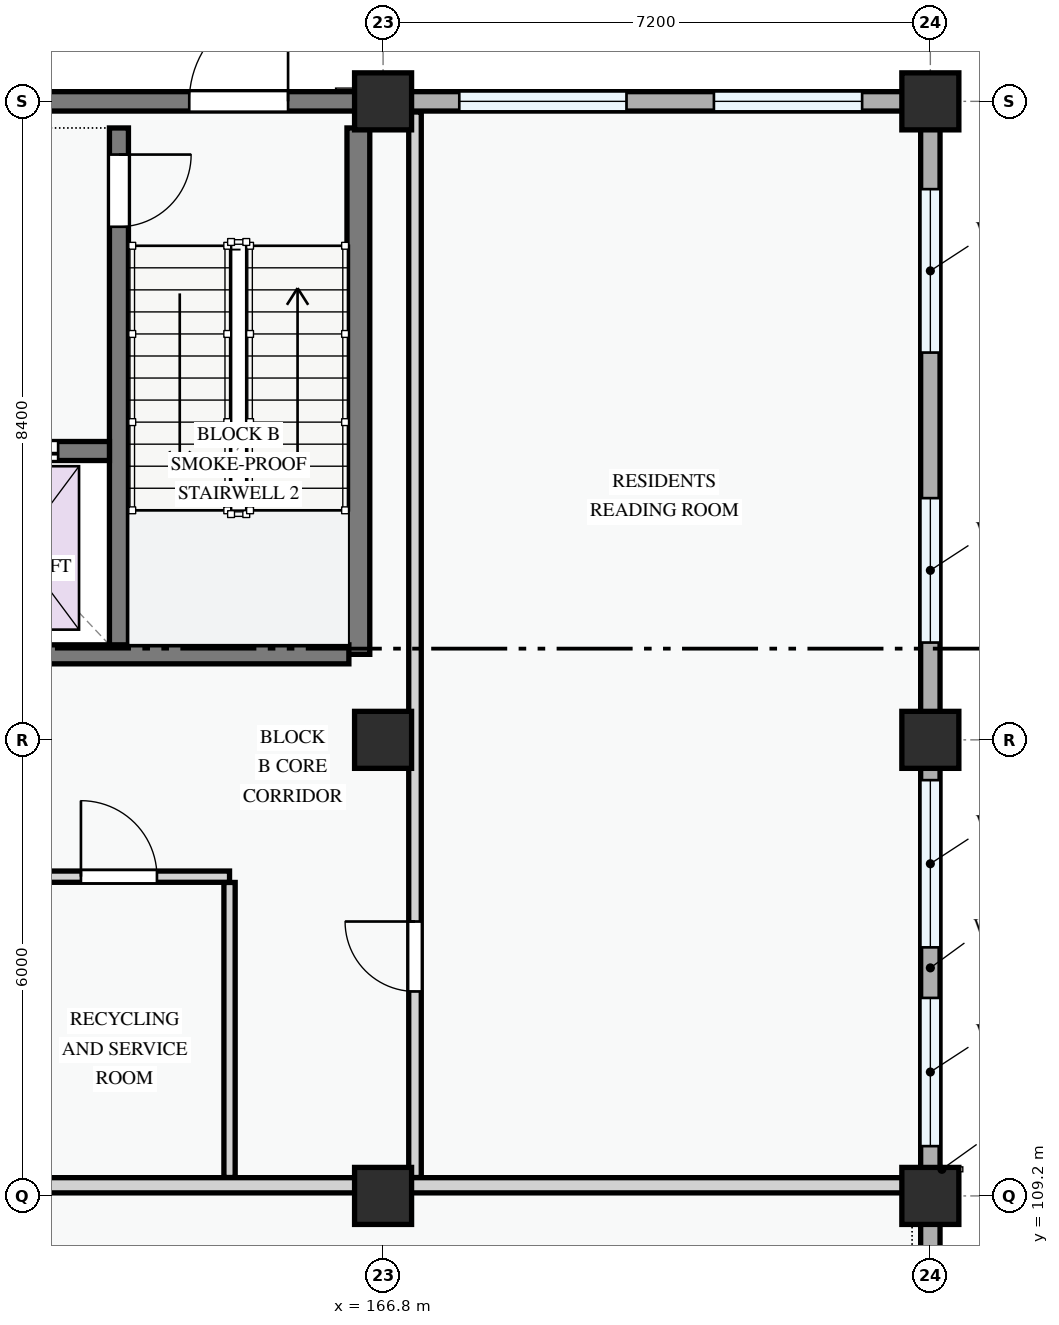
"""IFC4 building model, lengths in metres.
Left out: names, types, materials, properties, quantities, classifications, styles, units other than length and angle.
Written with IfcOpenShell. Run it as: python <this file> out.ifc"""

import sys

from ifc_helpers import new_model, si_unit, direction, frame, frame_2d, origin, origin_2d, place, context, subcontext, project, spatial, rectangle, extrude, element, fill, save


model = new_model("IFC4")
c1 = context("Model", 3, precision=1e-05, world=origin(), true_north=direction((0.0, 1.0)))
c2 = subcontext(c1, "Body", "Model", "MODEL_VIEW")
j1 = project(units=[si_unit("LENGTHUNIT", "METRE"), si_unit("PLANEANGLEUNIT", "RADIAN")], contexts=[c1])
p1 = place(None, origin())
s1 = spatial("IfcSite", under=j1, at=p1, CompositionType="ELEMENT")
p2 = place(p1, origin())
s2 = spatial("IfcBuilding", under=s1, at=p2, CompositionType="ELEMENT")
p3 = place(p2, origin())
s3 = spatial("IfcBuildingStorey", under=s2, at=p3, CompositionType="ELEMENT", Elevation=0.0)
for number, where, z_axis, x_axis in (
    (1, (166.8, 109.2, 0.0), (0.0, 0.0, 1.0), (1.0, 0.0, 0.0)),
    (2, (166.8, 115.2, 0.0), (0.0, 0.0, 1.0), (1.0, 0.0, 0.0)),
    (3, (166.8, 123.6, 0.0), (0.0, 0.0, 1.0), (1.0, 0.0, 0.0)),
    (4, (174.0, 109.2, 0.0), (0.0, 0.0, 1.0), (1.0, 0.0, 0.0)),
    (5, (174.0, 115.2, 0.0), (0.0, 0.0, 1.0), (1.0, 0.0, 0.0)),
    (6, (174.0, 123.6, 0.0), (0.0, 0.0, 1.0), (1.0, 0.0, 0.0)),
):
    element("IfcColumn", number, at=place(p3, frame(where, z_axis=z_axis, x_axis=x_axis)), inside=s3, PredefinedType="COLUMN", context=c2, shape_type="SweptSolid", body=[
        extrude(rectangle(XDim=0.75, YDim=0.75, at=origin_2d()), origin(), (0.0, 0.0, 1.0), 4.5),
    ])
p4 = place(p3, frame((174.0, 109.2, 0.0), z_axis=(0.0, 0.0, 1.0), x_axis=(0.0, 1.0, 0.0)))
e7 = element("IfcWall", 7, at=p4, inside=s3, PredefinedType="STANDARD", context=c2, shape_type="SweptSolid", body=[
    extrude(rectangle(XDim=6.0, YDim=0.255, at=frame_2d((3.0, 0.0))), origin(), (0.0, 0.0, 1.0), 3.585),
])
p5 = place(p4, frame((0.655, 0.0, 0.78)))
e8 = element("IfcOpeningElement", 8, at=p5, cuts=e7, PredefinedType="OPENING", context=c2, shape_type="SweptSolid", body=[
    extrude(rectangle(XDim=1.95, YDim=1.65, at=frame_2d((0.975, 0.825))), frame((0.0, 0.137, 0.0), z_axis=(0.0, -1.0, 0.0), x_axis=(1.0, 0.0, 0.0)), (0.0, 0.0, 1.0), 0.275),
])
p6 = place(p4, frame((3.27, 0.0, 0.78)))
e9 = element("IfcOpeningElement", 9, at=p6, cuts=e7, PredefinedType="OPENING", context=c2, shape_type="SweptSolid", body=[
    extrude(rectangle(XDim=2.2, YDim=1.5, at=frame_2d((1.1, 0.75))), frame((0.0, 0.137, 0.0), z_axis=(0.0, -1.0, 0.0), x_axis=(1.0, 0.0, 0.0)), (0.0, 0.0, 1.0), 0.275),
])
p7 = place(p3, frame((174.0, 115.2, 0.0), z_axis=(0.0, 0.0, 1.0), x_axis=(0.0, 1.0, 0.0)))
e10 = element("IfcWall", 10, at=p7, inside=s3, PredefinedType="STANDARD", context=c2, shape_type="SweptSolid", body=[
    extrude(rectangle(XDim=8.4, YDim=0.255, at=frame_2d((4.2, 0.0))), origin(), (0.0, 0.0, 1.0), 3.485),
])
p8 = place(p7, frame((1.28, 0.0, 0.78)))
e11 = element("IfcOpeningElement", 11, at=p8, cuts=e10, PredefinedType="OPENING", context=c2, shape_type="SweptSolid", body=[
    extrude(rectangle(XDim=1.9, YDim=1.55, at=frame_2d((0.95, 0.775))), frame((0.0, 0.137, 0.0), z_axis=(0.0, -1.0, 0.0), x_axis=(1.0, 0.0, 0.0)), (0.0, 0.0, 1.0), 0.275),
])
p9 = place(p7, frame((5.095, 0.0, 0.78)))
e12 = element("IfcOpeningElement", 12, at=p9, cuts=e10, PredefinedType="OPENING", context=c2, shape_type="SweptSolid", body=[
    extrude(rectangle(XDim=2.15, YDim=1.65, at=frame_2d((1.075, 0.825))), frame((0.0, 0.137, 0.0), z_axis=(0.0, -1.0, 0.0), x_axis=(1.0, 0.0, 0.0)), (0.0, 0.0, 1.0), 0.275),
])
p10 = place(p3, frame((174.0, 123.6, 0.0), z_axis=(0.0, 0.0, 1.0), x_axis=(-1.0, 0.0, 0.0)))
e13 = element("IfcWall", 13, at=p10, inside=s3, PredefinedType="STANDARD", context=c2, shape_type="SweptSolid", body=[
    extrude(rectangle(XDim=7.2, YDim=0.255, at=frame_2d((3.6, 0.0))), origin(), (0.0, 0.0, 1.0), 3.485),
])
p11 = place(p10, frame((0.897, 0.0, 0.78)))
e14 = element("IfcOpeningElement", 14, at=p11, cuts=e13, PredefinedType="OPENING", context=c2, shape_type="SweptSolid", body=[
    extrude(rectangle(XDim=1.95, YDim=1.65, at=frame_2d((0.975, 0.825))), frame((0.0, 0.137, 0.0), z_axis=(0.0, -1.0, 0.0), x_axis=(1.0, 0.0, 0.0)), (0.0, 0.0, 1.0), 0.275),
])
p12 = place(p10, frame((3.998, 0.0, 0.78)))
e15 = element("IfcOpeningElement", 15, at=p12, cuts=e13, PredefinedType="OPENING", context=c2, shape_type="SweptSolid", body=[
    extrude(rectangle(XDim=2.2, YDim=1.5, at=frame_2d((1.1, 0.75))), frame((0.0, 0.137, 0.0), z_axis=(0.0, -1.0, 0.0), x_axis=(1.0, 0.0, 0.0)), (0.0, 0.0, 1.0), 0.275),
])
p13 = place(p3, frame((166.8, 123.6, 0.0), z_axis=(0.0, 0.0, 1.0), x_axis=(-1.0, 0.0, 0.0)))
e16 = element("IfcWall", 16, at=p13, inside=s3, PredefinedType="STANDARD", context=c2, shape_type="SweptSolid", body=[
    extrude(rectangle(XDim=8.4, YDim=0.255, at=frame_2d((4.2, 0.0))), origin(), (0.0, 0.0, 1.0), 4.2),
])
p14 = place(p13, frame((6.4, 0.0, 0.0)))
e17 = element("IfcOpeningElement", 17, at=p14, cuts=e16, PredefinedType="OPENING", context=c2, shape_type="SweptSolid", body=[
    extrude(rectangle(XDim=1.6, YDim=2.35, at=frame_2d((0.8, 1.175))), frame((0.0, 0.137, 0.0), z_axis=(0.0, -1.0, 0.0), x_axis=(1.0, 0.0, 0.0)), (0.0, 0.0, 1.0), 0.275),
])
p15 = place(p13, frame((1.25, 0.0, 0.0)))
e18 = element("IfcOpeningElement", 18, at=p15, cuts=e16, PredefinedType="OPENING", context=c2, shape_type="SweptSolid", body=[
    extrude(rectangle(XDim=1.3, YDim=2.2, at=frame_2d((0.65, 1.1))), frame((0.0, 0.137, 0.0), z_axis=(0.0, -1.0, 0.0), x_axis=(1.0, 0.0, 0.0)), (0.0, 0.0, 1.0), 0.275),
])
p16 = place(p3, frame((174.0, 100.8, 0.0), z_axis=(0.0, 0.0, 1.0), x_axis=(0.0, 1.0, 0.0)))
e19 = element("IfcWall", 19, at=p16, inside=s3, PredefinedType="STANDARD", context=c2, shape_type="SweptSolid", body=[
    extrude(rectangle(XDim=8.4, YDim=0.255, at=frame_2d((4.2, 0.0))), origin(), (0.0, 0.0, 1.0), 3.485),
])
p17 = place(p16, frame((1.27, 0.0, 0.78)))
e20 = element("IfcOpeningElement", 20, at=p17, cuts=e19, PredefinedType="OPENING", context=c2, shape_type="SweptSolid", body=[
    extrude(rectangle(XDim=1.92, YDim=1.44, at=frame_2d((0.96, 0.72))), frame((0.0, 0.137, 0.0), z_axis=(0.0, -1.0, 0.0), x_axis=(1.0, 0.0, 0.0)), (0.0, 0.0, 1.0), 0.275),
])
p18 = place(p16, frame((5.03, 0.0, 0.78)))
e21 = element("IfcOpeningElement", 21, at=p18, cuts=e19, PredefinedType="OPENING", context=c2, shape_type="SweptSolid", body=[
    extrude(rectangle(XDim=2.28, YDim=1.46, at=frame_2d((1.14, 0.73))), frame((0.0, 0.137, 0.0), z_axis=(0.0, -1.0, 0.0), x_axis=(1.0, 0.0, 0.0)), (0.0, 0.0, 1.0), 0.275),
])
p19 = place(p3, frame((166.475, 123.25, 0.0), z_axis=(0.0, 0.0, 1.0), x_axis=(0.0, -1.0, 0.0)))
e22 = element("IfcWall", 22, at=p19, inside=s3, PredefinedType="SHEAR", context=c2, shape_type="SweptSolid", body=[
    extrude(rectangle(XDim=6.925, YDim=0.3, at=frame_2d((3.462, 0.0))), origin(), (0.0, 0.0, 1.0), 4.2),
])
p20 = place(p3, frame((163.325, 123.25, 0.0), z_axis=(0.0, 0.0, 1.0), x_axis=(0.0, -1.0, 0.0)))
e23 = element("IfcWall", 23, at=p20, inside=s3, PredefinedType="SHEAR", context=c2, shape_type="SweptSolid", body=[
    extrude(rectangle(XDim=6.925, YDim=0.25, at=frame_2d((3.462, 0.0))), origin(), (0.0, 0.0, 1.0), 4.2),
])
p21 = place(p20, frame((0.35, 0.0, 0.0)))
e24 = element("IfcOpeningElement", 24, at=p21, cuts=e23, PredefinedType="OPENING", context=c2, shape_type="SweptSolid", body=[
    extrude(rectangle(XDim=0.95, YDim=2.1, at=frame_2d((0.475, 1.05))), frame((0.0, 0.135, 0.0), z_axis=(0.0, -1.0, 0.0), x_axis=(1.0, 0.0, 0.0)), (0.0, 0.0, 1.0), 0.27),
])
p22 = place(p3, frame((160.775, 119.0, 0.0), z_axis=(0.0, 0.0, 1.0), x_axis=(1.0, 0.0, 0.0)))
e25 = element("IfcWall", 25, at=p22, inside=s3, PredefinedType="SHEAR", context=c2, shape_type="SweptSolid", body=[
    extrude(rectangle(XDim=2.425, YDim=0.25, at=frame_2d((1.212, 0.0))), origin(), (0.0, 0.0, 1.0), 4.2),
])
p23 = place(p22, frame((0.65, 0.0, 0.0)))
e26 = element("IfcOpeningElement", 26, at=p23, cuts=e25, PredefinedType="OPENING", context=c2, shape_type="SweptSolid", body=[
    extrude(rectangle(XDim=1.1, YDim=2.15, at=frame_2d((0.55, 1.075))), frame((0.0, 0.135, 0.0), z_axis=(0.0, -1.0, 0.0), x_axis=(1.0, 0.0, 0.0)), (0.0, 0.0, 1.0), 0.27),
])
p24 = place(p3, frame((152.85, 116.325, 0.0), z_axis=(0.0, 0.0, 1.0), x_axis=(1.0, 0.0, 0.0)))
e27 = element("IfcWall", 27, at=p24, inside=s3, PredefinedType="SHEAR", context=c2, shape_type="SweptSolid", body=[
    extrude(rectangle(XDim=13.5, YDim=0.25, at=frame_2d((6.75, 0.0))), origin(), (0.0, 0.0, 1.0), 4.2),
])
p25 = place(p24, frame((6.2, 0.0, 0.0)))
e28 = element("IfcOpeningElement", 28, at=p25, cuts=e27, PredefinedType="OPENING", context=c2, shape_type="SweptSolid", body=[
    extrude(rectangle(XDim=1.1, YDim=2.15, at=frame_2d((0.55, 1.075))), frame((0.0, 0.135, 0.0), z_axis=(0.0, -1.0, 0.0), x_axis=(1.0, 0.0, 0.0)), (0.0, 0.0, 1.0), 0.27),
])
p26 = place(p3, frame((164.78, 113.324, 0.0), z_axis=(0.0, 0.0, 1.0), x_axis=(0.0, -1.0, 0.0)))
e29 = element("IfcWall", 29, at=p26, inside=s3, PredefinedType="PARTITIONING", context=c2, shape_type="SweptSolid", body=[
    extrude(rectangle(XDim=3.882, YDim=0.148, at=frame_2d((1.941, 0.0))), origin(), (0.0, 0.0, 1.0), 4.2),
])
p27 = place(p3, frame((162.025, 113.4, 0.0), z_axis=(0.0, 0.0, 1.0), x_axis=(1.0, 0.0, 0.0)))
e30 = element("IfcWall", 30, at=p27, inside=s3, PredefinedType="PARTITIONING", context=c2, shape_type="SweptSolid", body=[
    extrude(rectangle(XDim=2.755, YDim=0.148, at=frame_2d((1.377, 0.0))), origin(), (0.0, 0.0, 1.0), 4.2),
])
p28 = place(p27, frame((0.8, 0.0, 0.0)))
e31 = element("IfcOpeningElement", 31, at=p28, cuts=e30, PredefinedType="OPENING", context=c2, shape_type="SweptSolid", body=[
    extrude(rectangle(XDim=1.0, YDim=2.15, at=frame_2d((0.5, 1.075))), frame((0.0, 0.084, 0.0), z_axis=(0.0, -1.0, 0.0), x_axis=(1.0, 0.0, 0.0)), (0.0, 0.0, 1.0), 0.168),
])
p29 = place(p3, frame((167.22, 109.442, 0.0), z_axis=(0.0, 0.0, 1.0), x_axis=(0.0, 1.0, 0.0)))
e32 = element("IfcWall", 32, at=p29, inside=s3, PredefinedType="PARTITIONING", context=c2, shape_type="SweptSolid", body=[
    extrude(rectangle(XDim=14.018, YDim=0.165, at=frame_2d((7.009, 0.0))), origin(), (0.0, 0.0, 1.0), 3.485),
])
p30 = place(p29, frame((2.448, 0.0, 0.0)))
e33 = element("IfcOpeningElement", 33, at=p30, cuts=e32, PredefinedType="OPENING", context=c2, shape_type="SweptSolid", body=[
    extrude(rectangle(XDim=0.92, YDim=2.1, at=frame_2d((0.46, 1.05))), frame((0.0, 0.093, 0.0), z_axis=(0.0, -1.0, 0.0), x_axis=(1.0, 0.0, 0.0)), (0.0, 0.0, 1.0), 0.185),
])
p31 = place(p3, frame((162.064, 109.34, 0.0), z_axis=(0.0, 0.0, 1.0), x_axis=(1.0, 0.0, 0.0)))
e34 = element("IfcWall", 34, at=p31, inside=s3, PredefinedType="PARTITIONING", context=c2, shape_type="SweptSolid", body=[
    extrude(rectangle(XDim=11.806, YDim=0.2, at=frame_2d((5.903, 0.0))), origin(), (0.0, 0.0, 1.0), 3.485),
])
p32 = place(p5, origin())
e35 = element("IfcWindow", 35, at=p32, inside=s3, PartitioningType="DOUBLE_PANEL_VERTICAL", PredefinedType="WINDOW", context=c2, shape_type="SweptSolid", body=[
    extrude(rectangle(XDim=1.95, YDim=1.65, at=frame_2d((0.975, 0.825))), frame((0.0, 0.03, 0.0), z_axis=(0.0, -1.0, 0.0), x_axis=(1.0, 0.0, 0.0)), (0.0, 0.0, 1.0), 0.06),
])
fill(e8, e35)
p33 = place(p6, origin())
e36 = element("IfcWindow", 36, at=p33, inside=s3, PartitioningType="DOUBLE_PANEL_VERTICAL", PredefinedType="WINDOW", context=c2, shape_type="SweptSolid", body=[
    extrude(rectangle(XDim=2.2, YDim=1.5, at=frame_2d((1.1, 0.75))), frame((0.0, 0.03, 0.0), z_axis=(0.0, -1.0, 0.0), x_axis=(1.0, 0.0, 0.0)), (0.0, 0.0, 1.0), 0.06),
])
fill(e9, e36)
p34 = place(p8, origin())
e37 = element("IfcWindow", 37, at=p34, inside=s3, PartitioningType="DOUBLE_PANEL_VERTICAL", PredefinedType="WINDOW", context=c2, shape_type="SweptSolid", body=[
    extrude(rectangle(XDim=1.9, YDim=1.55, at=frame_2d((0.95, 0.775))), frame((0.0, 0.03, 0.0), z_axis=(0.0, -1.0, 0.0), x_axis=(1.0, 0.0, 0.0)), (0.0, 0.0, 1.0), 0.06),
])
fill(e11, e37)
p35 = place(p9, origin())
e38 = element("IfcWindow", 38, at=p35, inside=s3, PartitioningType="DOUBLE_PANEL_VERTICAL", PredefinedType="WINDOW", context=c2, shape_type="SweptSolid", body=[
    extrude(rectangle(XDim=2.15, YDim=1.65, at=frame_2d((1.075, 0.825))), frame((0.0, 0.03, 0.0), z_axis=(0.0, -1.0, 0.0), x_axis=(1.0, 0.0, 0.0)), (0.0, 0.0, 1.0), 0.06),
])
fill(e12, e38)
p36 = place(p11, origin())
e39 = element("IfcWindow", 39, at=p36, inside=s3, PartitioningType="DOUBLE_PANEL_VERTICAL", PredefinedType="WINDOW", context=c2, shape_type="SweptSolid", body=[
    extrude(rectangle(XDim=1.95, YDim=1.65, at=frame_2d((0.975, 0.825))), frame((0.0, 0.03, 0.0), z_axis=(0.0, -1.0, 0.0), x_axis=(1.0, 0.0, 0.0)), (0.0, 0.0, 1.0), 0.06),
])
fill(e14, e39)
p37 = place(p12, origin())
e40 = element("IfcWindow", 40, at=p37, inside=s3, PartitioningType="DOUBLE_PANEL_VERTICAL", PredefinedType="WINDOW", context=c2, shape_type="SweptSolid", body=[
    extrude(rectangle(XDim=2.2, YDim=1.5, at=frame_2d((1.1, 0.75))), frame((0.0, 0.03, 0.0), z_axis=(0.0, -1.0, 0.0), x_axis=(1.0, 0.0, 0.0)), (0.0, 0.0, 1.0), 0.06),
])
fill(e15, e40)
p38 = place(p15, frame((1.3, 0.0, 0.0), z_axis=(0.0, 0.0, 1.0), x_axis=(-1.0, 0.0, 0.0)))
e41 = element("IfcDoor", 41, at=p38, inside=s3, OperationType="SINGLE_SWING_RIGHT", PredefinedType="DOOR", context=c2, shape_type="SweptSolid", body=[
    extrude(rectangle(XDim=1.3, YDim=2.2, at=frame_2d((0.65, 1.1))), frame((0.0, 0.025, 0.0), z_axis=(0.0, -1.0, 0.0), x_axis=(1.0, 0.0, 0.0)), (0.0, 0.0, 1.0), 0.05),
])
fill(e18, e41)
p39 = place(p21, origin())
e42 = element("IfcDoor", 42, at=p39, inside=s3, OperationType="SINGLE_SWING_LEFT", PredefinedType="DOOR", context=c2, shape_type="SweptSolid", body=[
    extrude(rectangle(XDim=0.95, YDim=2.1, at=frame_2d((0.475, 1.05))), frame((0.0, 0.025, 0.0), z_axis=(0.0, -1.0, 0.0), x_axis=(1.0, 0.0, 0.0)), (0.0, 0.0, 1.0), 0.05),
])
fill(e24, e42)
p40 = place(p23, origin())
e43 = element("IfcDoor", 43, at=p40, inside=s3, OperationType="SLIDING_TO_LEFT", PredefinedType="DOOR", context=c2, shape_type="SweptSolid", body=[
    extrude(rectangle(XDim=1.1, YDim=2.15, at=frame_2d((0.55, 1.075))), frame((0.0, 0.025, 0.0), z_axis=(0.0, -1.0, 0.0), x_axis=(1.0, 0.0, 0.0)), (0.0, 0.0, 1.0), 0.05),
])
fill(e26, e43)
p41 = place(p28, origin())
e44 = element("IfcDoor", 44, at=p41, inside=s3, OperationType="SINGLE_SWING_LEFT", PredefinedType="DOOR", context=c2, shape_type="SweptSolid", body=[
    extrude(rectangle(XDim=1.0, YDim=2.15, at=frame_2d((0.5, 1.075))), frame((0.0, 0.025, 0.0), z_axis=(0.0, -1.0, 0.0), x_axis=(1.0, 0.0, 0.0)), (0.0, 0.0, 1.0), 0.05),
])
fill(e31, e44)
p42 = place(p30, origin())
e45 = element("IfcDoor", 45, at=p42, inside=s3, OperationType="SINGLE_SWING_RIGHT", PredefinedType="DOOR", context=c2, shape_type="SweptSolid", body=[
    extrude(rectangle(XDim=0.92, YDim=2.1, at=frame_2d((0.46, 1.05))), frame((0.0, 0.025, 0.0), z_axis=(0.0, -1.0, 0.0), x_axis=(1.0, 0.0, 0.0)), (0.0, 0.0, 1.0), 0.05),
])
fill(e33, e45)
save(model, sys.argv[1])
